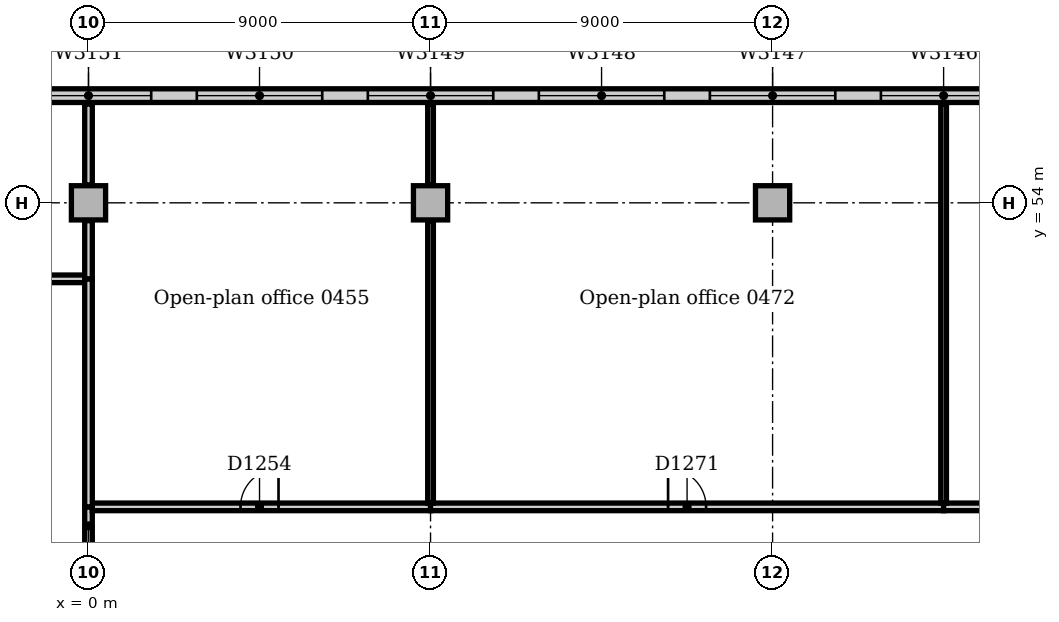
"""IFC4 building model, lengths in metres.
Left out: names, types, materials, properties, quantities, classifications, styles, units other than length and angle.
Written with IfcOpenShell. Run it as: python <this file> out.ifc"""

import sys

from ifc_helpers import new_model, si_unit, direction, frame, frame_2d, origin, origin_2d, place, context, subcontext, project, spatial, rectangle, extrude, element, fill, save


model = new_model("IFC4")
c1 = context("Model", 3, precision=1e-05, world=origin(), true_north=direction((0.0, 1.0)))
c2 = subcontext(c1, "Body", "Model", "MODEL_VIEW")
j1 = project(units=[si_unit("LENGTHUNIT", "METRE"), si_unit("PLANEANGLEUNIT", "RADIAN")], contexts=[c1])
p1 = place(None, origin())
s1 = spatial("IfcSite", under=j1, at=p1, CompositionType="ELEMENT")
p2 = place(p1, origin())
s2 = spatial("IfcBuilding", under=s1, at=p2, CompositionType="ELEMENT")
p3 = place(p2, frame((0.0, 0.0, 21.0)))
s3 = spatial("IfcBuildingStorey", under=s2, at=p3, CompositionType="ELEMENT", Elevation=21.0)
for number, where, z_axis, x_axis in (
    (1, (0.0, 54.0, 0.0), (0.0, 0.0, 1.0), (1.0, 0.0, 0.0)),
    (2, (9.0, 54.0, 0.0), (0.0, 0.0, 1.0), (1.0, 0.0, 0.0)),
    (3, (18.0, 54.0, 0.0), (0.0, 0.0, 1.0), (1.0, 0.0, 0.0)),
):
    element("IfcColumn", number, at=place(p3, frame(where, z_axis=z_axis, x_axis=x_axis)), inside=s3, PredefinedType="COLUMN", context=c2, shape_type="SweptSolid", body=[
        extrude(rectangle(XDim=0.9, YDim=0.9, at=origin_2d()), origin(), (0.0, 0.0, 1.0), 4.7),
    ])
p4 = place(p3, frame((63.0, 56.82, 0.0), z_axis=(0.0, 0.0, 1.0), x_axis=(-1.0, 0.0, 0.0)))
e4 = element("IfcWall", 4, at=p4, inside=s3, PredefinedType="STANDARD", context=c2, shape_type="SweptSolid", body=[
    extrude(rectangle(XDim=144.0, YDim=0.36, at=frame_2d((72.0, 0.0))), origin(), (0.0, 0.0, 1.0), 4.85),
])
p5 = place(p4, frame((2.85, 0.0, 0.9)))
e5 = element("IfcOpeningElement", 5, at=p5, cuts=e4, PredefinedType="OPENING", context=c2, shape_type="SweptSolid", body=[
    extrude(rectangle(XDim=3.3, YDim=2.4, at=frame_2d((1.65, 1.2))), frame((0.0, 0.19, 0.0), z_axis=(0.0, -1.0, 0.0), x_axis=(1.0, 0.0, 0.0)), (0.0, 0.0, 1.0), 0.38),
])
p6 = place(p4, frame((7.35, 0.0, 0.9)))
e6 = element("IfcOpeningElement", 6, at=p6, cuts=e4, PredefinedType="OPENING", context=c2, shape_type="SweptSolid", body=[
    extrude(rectangle(XDim=3.3, YDim=2.4, at=frame_2d((1.65, 1.2))), frame((0.0, 0.19, 0.0), z_axis=(0.0, -1.0, 0.0), x_axis=(1.0, 0.0, 0.0)), (0.0, 0.0, 1.0), 0.38),
])
p7 = place(p4, frame((11.85, 0.0, 0.9)))
e7 = element("IfcOpeningElement", 7, at=p7, cuts=e4, PredefinedType="OPENING", context=c2, shape_type="SweptSolid", body=[
    extrude(rectangle(XDim=3.3, YDim=2.4, at=frame_2d((1.65, 1.2))), frame((0.0, 0.19, 0.0), z_axis=(0.0, -1.0, 0.0), x_axis=(1.0, 0.0, 0.0)), (0.0, 0.0, 1.0), 0.38),
])
p8 = place(p4, frame((16.35, 0.0, 0.9)))
e8 = element("IfcOpeningElement", 8, at=p8, cuts=e4, PredefinedType="OPENING", context=c2, shape_type="SweptSolid", body=[
    extrude(rectangle(XDim=3.3, YDim=2.4, at=frame_2d((1.65, 1.2))), frame((0.0, 0.19, 0.0), z_axis=(0.0, -1.0, 0.0), x_axis=(1.0, 0.0, 0.0)), (0.0, 0.0, 1.0), 0.38),
])
p9 = place(p4, frame((20.85, 0.0, 0.9)))
e9 = element("IfcOpeningElement", 9, at=p9, cuts=e4, PredefinedType="OPENING", context=c2, shape_type="SweptSolid", body=[
    extrude(rectangle(XDim=3.3, YDim=2.4, at=frame_2d((1.65, 1.2))), frame((0.0, 0.19, 0.0), z_axis=(0.0, -1.0, 0.0), x_axis=(1.0, 0.0, 0.0)), (0.0, 0.0, 1.0), 0.38),
])
p10 = place(p4, frame((25.35, 0.0, 0.9)))
e10 = element("IfcOpeningElement", 10, at=p10, cuts=e4, PredefinedType="OPENING", context=c2, shape_type="SweptSolid", body=[
    extrude(rectangle(XDim=3.3, YDim=2.4, at=frame_2d((1.65, 1.2))), frame((0.0, 0.19, 0.0), z_axis=(0.0, -1.0, 0.0), x_axis=(1.0, 0.0, 0.0)), (0.0, 0.0, 1.0), 0.38),
])
p11 = place(p4, frame((29.85, 0.0, 0.9)))
e11 = element("IfcOpeningElement", 11, at=p11, cuts=e4, PredefinedType="OPENING", context=c2, shape_type="SweptSolid", body=[
    extrude(rectangle(XDim=3.3, YDim=2.4, at=frame_2d((1.65, 1.2))), frame((0.0, 0.19, 0.0), z_axis=(0.0, -1.0, 0.0), x_axis=(1.0, 0.0, 0.0)), (0.0, 0.0, 1.0), 0.38),
])
p12 = place(p4, frame((34.35, 0.0, 0.9)))
e12 = element("IfcOpeningElement", 12, at=p12, cuts=e4, PredefinedType="OPENING", context=c2, shape_type="SweptSolid", body=[
    extrude(rectangle(XDim=3.3, YDim=2.4, at=frame_2d((1.65, 1.2))), frame((0.0, 0.19, 0.0), z_axis=(0.0, -1.0, 0.0), x_axis=(1.0, 0.0, 0.0)), (0.0, 0.0, 1.0), 0.38),
])
p13 = place(p4, frame((38.85, 0.0, 0.9)))
e13 = element("IfcOpeningElement", 13, at=p13, cuts=e4, PredefinedType="OPENING", context=c2, shape_type="SweptSolid", body=[
    extrude(rectangle(XDim=3.3, YDim=2.4, at=frame_2d((1.65, 1.2))), frame((0.0, 0.19, 0.0), z_axis=(0.0, -1.0, 0.0), x_axis=(1.0, 0.0, 0.0)), (0.0, 0.0, 1.0), 0.38),
])
p14 = place(p4, frame((43.35, 0.0, 0.9)))
e14 = element("IfcOpeningElement", 14, at=p14, cuts=e4, PredefinedType="OPENING", context=c2, shape_type="SweptSolid", body=[
    extrude(rectangle(XDim=3.3, YDim=2.4, at=frame_2d((1.65, 1.2))), frame((0.0, 0.19, 0.0), z_axis=(0.0, -1.0, 0.0), x_axis=(1.0, 0.0, 0.0)), (0.0, 0.0, 1.0), 0.38),
])
p15 = place(p4, frame((47.85, 0.0, 0.9)))
e15 = element("IfcOpeningElement", 15, at=p15, cuts=e4, PredefinedType="OPENING", context=c2, shape_type="SweptSolid", body=[
    extrude(rectangle(XDim=3.3, YDim=2.4, at=frame_2d((1.65, 1.2))), frame((0.0, 0.19, 0.0), z_axis=(0.0, -1.0, 0.0), x_axis=(1.0, 0.0, 0.0)), (0.0, 0.0, 1.0), 0.38),
])
p16 = place(p4, frame((52.35, 0.0, 0.9)))
e16 = element("IfcOpeningElement", 16, at=p16, cuts=e4, PredefinedType="OPENING", context=c2, shape_type="SweptSolid", body=[
    extrude(rectangle(XDim=3.3, YDim=2.4, at=frame_2d((1.65, 1.2))), frame((0.0, 0.19, 0.0), z_axis=(0.0, -1.0, 0.0), x_axis=(1.0, 0.0, 0.0)), (0.0, 0.0, 1.0), 0.38),
])
p17 = place(p4, frame((56.85, 0.0, 0.9)))
e17 = element("IfcOpeningElement", 17, at=p17, cuts=e4, PredefinedType="OPENING", context=c2, shape_type="SweptSolid", body=[
    extrude(rectangle(XDim=3.3, YDim=2.4, at=frame_2d((1.65, 1.2))), frame((0.0, 0.19, 0.0), z_axis=(0.0, -1.0, 0.0), x_axis=(1.0, 0.0, 0.0)), (0.0, 0.0, 1.0), 0.38),
])
p18 = place(p4, frame((61.35, 0.0, 0.9)))
e18 = element("IfcOpeningElement", 18, at=p18, cuts=e4, PredefinedType="OPENING", context=c2, shape_type="SweptSolid", body=[
    extrude(rectangle(XDim=3.3, YDim=2.4, at=frame_2d((1.65, 1.2))), frame((0.0, 0.19, 0.0), z_axis=(0.0, -1.0, 0.0), x_axis=(1.0, 0.0, 0.0)), (0.0, 0.0, 1.0), 0.38),
])
p19 = place(p4, frame((65.85, 0.0, 0.9)))
e19 = element("IfcOpeningElement", 19, at=p19, cuts=e4, PredefinedType="OPENING", context=c2, shape_type="SweptSolid", body=[
    extrude(rectangle(XDim=3.3, YDim=2.4, at=frame_2d((1.65, 1.2))), frame((0.0, 0.19, 0.0), z_axis=(0.0, -1.0, 0.0), x_axis=(1.0, 0.0, 0.0)), (0.0, 0.0, 1.0), 0.38),
])
p20 = place(p4, frame((70.35, 0.0, 0.9)))
e20 = element("IfcOpeningElement", 20, at=p20, cuts=e4, PredefinedType="OPENING", context=c2, shape_type="SweptSolid", body=[
    extrude(rectangle(XDim=3.3, YDim=2.4, at=frame_2d((1.65, 1.2))), frame((0.0, 0.19, 0.0), z_axis=(0.0, -1.0, 0.0), x_axis=(1.0, 0.0, 0.0)), (0.0, 0.0, 1.0), 0.38),
])
p21 = place(p4, frame((74.85, 0.0, 0.9)))
e21 = element("IfcOpeningElement", 21, at=p21, cuts=e4, PredefinedType="OPENING", context=c2, shape_type="SweptSolid", body=[
    extrude(rectangle(XDim=3.3, YDim=2.4, at=frame_2d((1.65, 1.2))), frame((0.0, 0.19, 0.0), z_axis=(0.0, -1.0, 0.0), x_axis=(1.0, 0.0, 0.0)), (0.0, 0.0, 1.0), 0.38),
])
p22 = place(p4, frame((79.35, 0.0, 0.9)))
e22 = element("IfcOpeningElement", 22, at=p22, cuts=e4, PredefinedType="OPENING", context=c2, shape_type="SweptSolid", body=[
    extrude(rectangle(XDim=3.3, YDim=2.4, at=frame_2d((1.65, 1.2))), frame((0.0, 0.19, 0.0), z_axis=(0.0, -1.0, 0.0), x_axis=(1.0, 0.0, 0.0)), (0.0, 0.0, 1.0), 0.38),
])
p23 = place(p4, frame((83.85, 0.0, 0.9)))
e23 = element("IfcOpeningElement", 23, at=p23, cuts=e4, PredefinedType="OPENING", context=c2, shape_type="SweptSolid", body=[
    extrude(rectangle(XDim=3.3, YDim=2.4, at=frame_2d((1.65, 1.2))), frame((0.0, 0.19, 0.0), z_axis=(0.0, -1.0, 0.0), x_axis=(1.0, 0.0, 0.0)), (0.0, 0.0, 1.0), 0.38),
])
p24 = place(p4, frame((88.35, 0.0, 0.9)))
e24 = element("IfcOpeningElement", 24, at=p24, cuts=e4, PredefinedType="OPENING", context=c2, shape_type="SweptSolid", body=[
    extrude(rectangle(XDim=3.3, YDim=2.4, at=frame_2d((1.65, 1.2))), frame((0.0, 0.19, 0.0), z_axis=(0.0, -1.0, 0.0), x_axis=(1.0, 0.0, 0.0)), (0.0, 0.0, 1.0), 0.38),
])
p25 = place(p4, frame((92.85, 0.0, 0.9)))
e25 = element("IfcOpeningElement", 25, at=p25, cuts=e4, PredefinedType="OPENING", context=c2, shape_type="SweptSolid", body=[
    extrude(rectangle(XDim=3.3, YDim=2.4, at=frame_2d((1.65, 1.2))), frame((0.0, 0.19, 0.0), z_axis=(0.0, -1.0, 0.0), x_axis=(1.0, 0.0, 0.0)), (0.0, 0.0, 1.0), 0.38),
])
p26 = place(p4, frame((97.35, 0.0, 0.9)))
e26 = element("IfcOpeningElement", 26, at=p26, cuts=e4, PredefinedType="OPENING", context=c2, shape_type="SweptSolid", body=[
    extrude(rectangle(XDim=3.3, YDim=2.4, at=frame_2d((1.65, 1.2))), frame((0.0, 0.19, 0.0), z_axis=(0.0, -1.0, 0.0), x_axis=(1.0, 0.0, 0.0)), (0.0, 0.0, 1.0), 0.38),
])
p27 = place(p4, frame((101.85, 0.0, 0.9)))
e27 = element("IfcOpeningElement", 27, at=p27, cuts=e4, PredefinedType="OPENING", context=c2, shape_type="SweptSolid", body=[
    extrude(rectangle(XDim=3.3, YDim=2.4, at=frame_2d((1.65, 1.2))), frame((0.0, 0.19, 0.0), z_axis=(0.0, -1.0, 0.0), x_axis=(1.0, 0.0, 0.0)), (0.0, 0.0, 1.0), 0.38),
])
p28 = place(p4, frame((106.35, 0.0, 0.9)))
e28 = element("IfcOpeningElement", 28, at=p28, cuts=e4, PredefinedType="OPENING", context=c2, shape_type="SweptSolid", body=[
    extrude(rectangle(XDim=3.3, YDim=2.4, at=frame_2d((1.65, 1.2))), frame((0.0, 0.19, 0.0), z_axis=(0.0, -1.0, 0.0), x_axis=(1.0, 0.0, 0.0)), (0.0, 0.0, 1.0), 0.38),
])
p29 = place(p4, frame((110.85, 0.0, 0.9)))
e29 = element("IfcOpeningElement", 29, at=p29, cuts=e4, PredefinedType="OPENING", context=c2, shape_type="SweptSolid", body=[
    extrude(rectangle(XDim=3.3, YDim=2.4, at=frame_2d((1.65, 1.2))), frame((0.0, 0.19, 0.0), z_axis=(0.0, -1.0, 0.0), x_axis=(1.0, 0.0, 0.0)), (0.0, 0.0, 1.0), 0.38),
])
p30 = place(p4, frame((115.35, 0.0, 0.9)))
e30 = element("IfcOpeningElement", 30, at=p30, cuts=e4, PredefinedType="OPENING", context=c2, shape_type="SweptSolid", body=[
    extrude(rectangle(XDim=3.3, YDim=2.4, at=frame_2d((1.65, 1.2))), frame((0.0, 0.19, 0.0), z_axis=(0.0, -1.0, 0.0), x_axis=(1.0, 0.0, 0.0)), (0.0, 0.0, 1.0), 0.38),
])
p31 = place(p4, frame((119.85, 0.0, 0.9)))
e31 = element("IfcOpeningElement", 31, at=p31, cuts=e4, PredefinedType="OPENING", context=c2, shape_type="SweptSolid", body=[
    extrude(rectangle(XDim=3.3, YDim=2.4, at=frame_2d((1.65, 1.2))), frame((0.0, 0.19, 0.0), z_axis=(0.0, -1.0, 0.0), x_axis=(1.0, 0.0, 0.0)), (0.0, 0.0, 1.0), 0.38),
])
p32 = place(p4, frame((124.35, 0.0, 0.9)))
e32 = element("IfcOpeningElement", 32, at=p32, cuts=e4, PredefinedType="OPENING", context=c2, shape_type="SweptSolid", body=[
    extrude(rectangle(XDim=3.3, YDim=2.4, at=frame_2d((1.65, 1.2))), frame((0.0, 0.19, 0.0), z_axis=(0.0, -1.0, 0.0), x_axis=(1.0, 0.0, 0.0)), (0.0, 0.0, 1.0), 0.38),
])
p33 = place(p4, frame((128.85, 0.0, 0.9)))
e33 = element("IfcOpeningElement", 33, at=p33, cuts=e4, PredefinedType="OPENING", context=c2, shape_type="SweptSolid", body=[
    extrude(rectangle(XDim=3.3, YDim=2.4, at=frame_2d((1.65, 1.2))), frame((0.0, 0.19, 0.0), z_axis=(0.0, -1.0, 0.0), x_axis=(1.0, 0.0, 0.0)), (0.0, 0.0, 1.0), 0.38),
])
p34 = place(p4, frame((133.35, 0.0, 0.9)))
e34 = element("IfcOpeningElement", 34, at=p34, cuts=e4, PredefinedType="OPENING", context=c2, shape_type="SweptSolid", body=[
    extrude(rectangle(XDim=3.3, YDim=2.4, at=frame_2d((1.65, 1.2))), frame((0.0, 0.19, 0.0), z_axis=(0.0, -1.0, 0.0), x_axis=(1.0, 0.0, 0.0)), (0.0, 0.0, 1.0), 0.38),
])
p35 = place(p4, frame((137.85, 0.0, 0.9)))
e35 = element("IfcOpeningElement", 35, at=p35, cuts=e4, PredefinedType="OPENING", context=c2, shape_type="SweptSolid", body=[
    extrude(rectangle(XDim=3.3, YDim=2.4, at=frame_2d((1.65, 1.2))), frame((0.0, 0.19, 0.0), z_axis=(0.0, -1.0, 0.0), x_axis=(1.0, 0.0, 0.0)), (0.0, 0.0, 1.0), 0.38),
])
p36 = place(p3, frame((0.0, 45.0, 0.0), z_axis=(0.0, 0.0, 1.0), x_axis=(0.0, 1.0, 0.0)))
e36 = element("IfcWall", 36, at=p36, inside=s3, PredefinedType="PARTITIONING", context=c2, shape_type="SweptSolid", body=[
    extrude(rectangle(XDim=1.0, YDim=0.2, at=frame_2d((0.5, 0.0))), origin(), (0.0, 0.0, 1.0), 4.7),
])
p37 = place(p3, frame((0.1, 46.0, 0.0), z_axis=(0.0, 0.0, 1.0), x_axis=(1.0, 0.0, 0.0)))
e37 = element("IfcWall", 37, at=p37, inside=s3, PredefinedType="PARTITIONING", context=c2, shape_type="SweptSolid", body=[
    extrude(rectangle(XDim=8.9, YDim=0.2, at=frame_2d((4.45, 0.0))), origin(), (0.0, 0.0, 1.0), 4.7),
])
p38 = place(p37, frame((3.9, 0.0, 0.0)))
e38 = element("IfcOpeningElement", 38, at=p38, cuts=e37, PredefinedType="OPENING", context=c2, shape_type="SweptSolid", body=[
    extrude(rectangle(XDim=1.0, YDim=2.1, at=frame_2d((0.5, 1.05))), frame((0.0, 0.11, 0.0), z_axis=(0.0, -1.0, 0.0), x_axis=(1.0, 0.0, 0.0)), (0.0, 0.0, 1.0), 0.22),
])
p39 = place(p3, frame((9.0, 46.0, 0.0), z_axis=(0.0, 0.0, 1.0), x_axis=(1.0, 0.0, 0.0)))
e39 = element("IfcWall", 39, at=p39, inside=s3, PredefinedType="PARTITIONING", context=c2, shape_type="SweptSolid", body=[
    extrude(rectangle(XDim=13.5, YDim=0.2, at=frame_2d((6.75, 0.0))), origin(), (0.0, 0.0, 1.0), 4.7),
])
p40 = place(p39, frame((6.25, 0.0, 0.0)))
e40 = element("IfcOpeningElement", 40, at=p40, cuts=e39, PredefinedType="OPENING", context=c2, shape_type="SweptSolid", body=[
    extrude(rectangle(XDim=1.0, YDim=2.1, at=frame_2d((0.5, 1.05))), frame((0.0, 0.11, 0.0), z_axis=(0.0, -1.0, 0.0), x_axis=(1.0, 0.0, 0.0)), (0.0, 0.0, 1.0), 0.22),
])
p41 = place(p3, frame((22.5, 46.0, 0.0), z_axis=(0.0, 0.0, 1.0), x_axis=(1.0, 0.0, 0.0)))
e41 = element("IfcWall", 41, at=p41, inside=s3, PredefinedType="PARTITIONING", context=c2, shape_type="SweptSolid", body=[
    extrude(rectangle(XDim=13.4, YDim=0.2, at=frame_2d((6.7, 0.0))), origin(), (0.0, 0.0, 1.0), 4.7),
])
p42 = place(p41, frame((6.25, 0.0, 0.0)))
e42 = element("IfcOpeningElement", 42, at=p42, cuts=e41, PredefinedType="OPENING", context=c2, shape_type="SweptSolid", body=[
    extrude(rectangle(XDim=1.0, YDim=2.1, at=frame_2d((0.5, 1.05))), frame((0.0, 0.11, 0.0), z_axis=(0.0, -1.0, 0.0), x_axis=(1.0, 0.0, 0.0)), (0.0, 0.0, 1.0), 0.22),
])
p43 = place(p3, frame((-9.0, 52.0, 0.0), z_axis=(0.0, 0.0, 1.0), x_axis=(1.0, 0.0, 0.0)))
e43 = element("IfcWall", 43, at=p43, inside=s3, PredefinedType="PARTITIONING", context=c2, shape_type="SweptSolid", body=[
    extrude(rectangle(XDim=8.9, YDim=0.2, at=frame_2d((4.45, 0.0))), origin(), (0.0, 0.0, 1.0), 4.7),
])
p44 = place(p43, frame((4.0, 0.0, 0.0)))
e44 = element("IfcOpeningElement", 44, at=p44, cuts=e43, PredefinedType="OPENING", context=c2, shape_type="SweptSolid", body=[
    extrude(rectangle(XDim=1.0, YDim=2.1, at=frame_2d((0.5, 1.05))), frame((0.0, 0.11, 0.0), z_axis=(0.0, -1.0, 0.0), x_axis=(1.0, 0.0, 0.0)), (0.0, 0.0, 1.0), 0.22),
])
p45 = place(p3, frame((0.0, 46.0, 0.0), z_axis=(0.0, 0.0, 1.0), x_axis=(0.0, 1.0, 0.0)))
e45 = element("IfcWall", 45, at=p45, inside=s3, PredefinedType="PARTITIONING", context=c2, shape_type="SweptSolid", body=[
    extrude(rectangle(XDim=6.0, YDim=0.2, at=frame_2d((3.0, 0.0))), origin(), (0.0, 0.0, 1.0), 4.7),
])
p46 = place(p3, frame((0.0, 52.0, 0.0), z_axis=(0.0, 0.0, 1.0), x_axis=(0.0, 1.0, 0.0)))
e46 = element("IfcWall", 46, at=p46, inside=s3, PredefinedType="PARTITIONING", context=c2, shape_type="SweptSolid", body=[
    extrude(rectangle(XDim=1.53, YDim=0.2, at=frame_2d((0.765, 0.0))), origin(), (0.0, 0.0, 1.0), 4.7),
])
p47 = place(p3, frame((0.0, 54.47, 0.0), z_axis=(0.0, 0.0, 1.0), x_axis=(0.0, 1.0, 0.0)))
e47 = element("IfcWall", 47, at=p47, inside=s3, PredefinedType="PARTITIONING", context=c2, shape_type="SweptSolid", body=[
    extrude(rectangle(XDim=2.13, YDim=0.2, at=frame_2d((1.065, 0.0))), origin(), (0.0, 0.0, 1.0), 4.7),
])
p48 = place(p3, frame((9.0, 46.1, 0.0), z_axis=(0.0, 0.0, 1.0), x_axis=(0.0, 1.0, 0.0)))
e48 = element("IfcWall", 48, at=p48, inside=s3, PredefinedType="PARTITIONING", context=c2, shape_type="SweptSolid", body=[
    extrude(rectangle(XDim=7.43, YDim=0.15, at=frame_2d((3.715, 0.0))), origin(), (0.0, 0.0, 1.0), 4.7),
])
p49 = place(p3, frame((9.0, 54.47, 0.0), z_axis=(0.0, 0.0, 1.0), x_axis=(0.0, 1.0, 0.0)))
e49 = element("IfcWall", 49, at=p49, inside=s3, PredefinedType="PARTITIONING", context=c2, shape_type="SweptSolid", body=[
    extrude(rectangle(XDim=2.13, YDim=0.15, at=frame_2d((1.065, 0.0))), origin(), (0.0, 0.0, 1.0), 4.7),
])
p50 = place(p3, frame((22.5, 46.1, 0.0), z_axis=(0.0, 0.0, 1.0), x_axis=(0.0, 1.0, 0.0)))
e50 = element("IfcWall", 50, at=p50, inside=s3, PredefinedType="PARTITIONING", context=c2, shape_type="SweptSolid", body=[
    extrude(rectangle(XDim=10.5, YDim=0.15, at=frame_2d((5.25, 0.0))), origin(), (0.0, 0.0, 1.0), 4.7),
])
p51 = place(p13, origin())
e51 = element("IfcWindow", 51, at=p51, inside=s3, PartitioningType="SINGLE_PANEL", PredefinedType="WINDOW", context=c2, shape_type="SweptSolid", body=[
    extrude(rectangle(XDim=3.3, YDim=2.4, at=frame_2d((1.65, 1.2))), frame((0.0, 0.13, 0.0), z_axis=(0.0, -1.0, 0.0), x_axis=(1.0, 0.0, 0.0)), (0.0, 0.0, 1.0), 0.06),
])
fill(e13, e51)
p52 = place(p14, origin())
e52 = element("IfcWindow", 52, at=p52, inside=s3, PartitioningType="SINGLE_PANEL", PredefinedType="WINDOW", context=c2, shape_type="SweptSolid", body=[
    extrude(rectangle(XDim=3.3, YDim=2.4, at=frame_2d((1.65, 1.2))), frame((0.0, 0.13, 0.0), z_axis=(0.0, -1.0, 0.0), x_axis=(1.0, 0.0, 0.0)), (0.0, 0.0, 1.0), 0.06),
])
fill(e14, e52)
p53 = place(p15, origin())
e53 = element("IfcWindow", 53, at=p53, inside=s3, PartitioningType="SINGLE_PANEL", PredefinedType="WINDOW", context=c2, shape_type="SweptSolid", body=[
    extrude(rectangle(XDim=3.3, YDim=2.4, at=frame_2d((1.65, 1.2))), frame((0.0, 0.13, 0.0), z_axis=(0.0, -1.0, 0.0), x_axis=(1.0, 0.0, 0.0)), (0.0, 0.0, 1.0), 0.06),
])
fill(e15, e53)
p54 = place(p16, origin())
e54 = element("IfcWindow", 54, at=p54, inside=s3, PartitioningType="SINGLE_PANEL", PredefinedType="WINDOW", context=c2, shape_type="SweptSolid", body=[
    extrude(rectangle(XDim=3.3, YDim=2.4, at=frame_2d((1.65, 1.2))), frame((0.0, 0.13, 0.0), z_axis=(0.0, -1.0, 0.0), x_axis=(1.0, 0.0, 0.0)), (0.0, 0.0, 1.0), 0.06),
])
fill(e16, e54)
p55 = place(p17, origin())
e55 = element("IfcWindow", 55, at=p55, inside=s3, PartitioningType="SINGLE_PANEL", PredefinedType="WINDOW", context=c2, shape_type="SweptSolid", body=[
    extrude(rectangle(XDim=3.3, YDim=2.4, at=frame_2d((1.65, 1.2))), frame((0.0, 0.13, 0.0), z_axis=(0.0, -1.0, 0.0), x_axis=(1.0, 0.0, 0.0)), (0.0, 0.0, 1.0), 0.06),
])
fill(e17, e55)
p56 = place(p18, origin())
e56 = element("IfcWindow", 56, at=p56, inside=s3, PartitioningType="SINGLE_PANEL", PredefinedType="WINDOW", context=c2, shape_type="SweptSolid", body=[
    extrude(rectangle(XDim=3.3, YDim=2.4, at=frame_2d((1.65, 1.2))), frame((0.0, 0.13, 0.0), z_axis=(0.0, -1.0, 0.0), x_axis=(1.0, 0.0, 0.0)), (0.0, 0.0, 1.0), 0.06),
])
fill(e18, e56)
p57 = place(p38, origin())
e57 = element("IfcDoor", 57, at=p57, inside=s3, OperationType="SINGLE_SWING_RIGHT", PredefinedType="DOOR", context=c2, shape_type="SweptSolid", body=[
    extrude(rectangle(XDim=1.0, YDim=2.1, at=frame_2d((0.5, 1.05))), frame((0.0, 0.025, 0.0), z_axis=(0.0, -1.0, 0.0), x_axis=(1.0, 0.0, 0.0)), (0.0, 0.0, 1.0), 0.05),
])
fill(e38, e57)
p58 = place(p40, origin())
e58 = element("IfcDoor", 58, at=p58, inside=s3, OperationType="SINGLE_SWING_LEFT", PredefinedType="DOOR", context=c2, shape_type="SweptSolid", body=[
    extrude(rectangle(XDim=1.0, YDim=2.1, at=frame_2d((0.5, 1.05))), frame((0.0, 0.025, 0.0), z_axis=(0.0, -1.0, 0.0), x_axis=(1.0, 0.0, 0.0)), (0.0, 0.0, 1.0), 0.05),
])
fill(e40, e58)
save(model, sys.argv[1])
